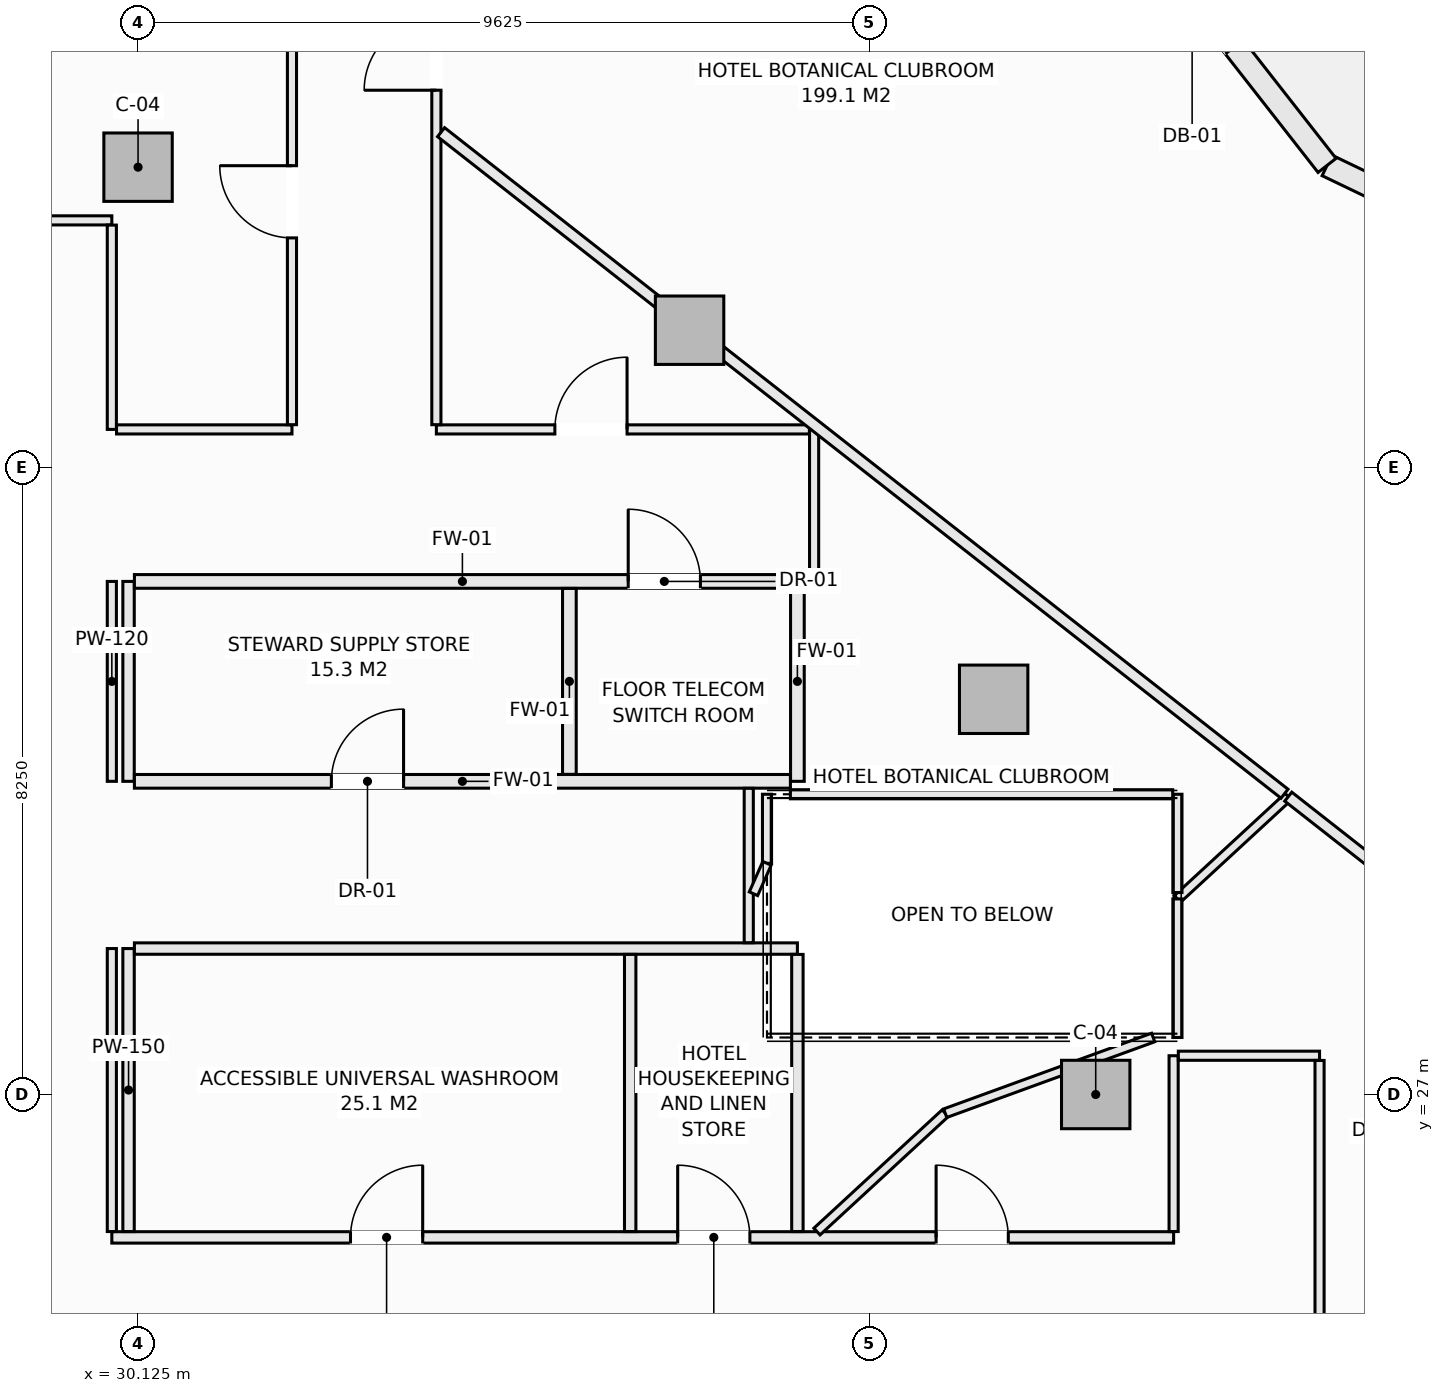
"""IFC4 building model, lengths in metres.
Left out: names, types, materials, properties, quantities, classifications, styles, units other than length and angle.
Written with IfcOpenShell. Run it as: python <this file> out.ifc"""

import sys

from ifc_helpers import new_model, si_unit, direction, frame, frame_2d, origin, origin_2d, place, context, subcontext, project, spatial, rectangle, extrude, element, fill, save


model = new_model("IFC4")
c1 = context("Model", 3, precision=1e-05, world=origin(), true_north=direction((0.0, 1.0)))
c2 = subcontext(c1, "Body", "Model", "MODEL_VIEW")
j1 = project(units=[si_unit("LENGTHUNIT", "METRE"), si_unit("PLANEANGLEUNIT", "RADIAN")], contexts=[c1])
p1 = place(None, origin())
s1 = spatial("IfcSite", under=j1, at=p1, CompositionType="ELEMENT")
p2 = place(p1, origin())
s2 = spatial("IfcBuilding", under=s1, at=p2, CompositionType="ELEMENT")
p3 = place(p2, frame((0.0, 0.0, 115.5)))
s3 = spatial("IfcBuildingStorey", under=s2, at=p3, CompositionType="ELEMENT", Elevation=115.5)
for number, where, z_axis, x_axis in (
    (1, (42.725, 27.0, -0.27), (0.0, 0.0, 1.0), (1.0, 0.0, 0.0)),
    (2, (41.382, 32.199, -0.27), (0.0, 0.0, 1.0), (1.0, 0.0, 0.0)),
    (3, (37.382, 37.055, -0.27), (0.0, 0.0, 1.0), (1.0, 0.0, 0.0)),
    (4, (30.125, 39.2, -0.27), (0.0, 0.0, 1.0), (1.0, 0.0, 0.0)),
):
    element("IfcColumn", number, at=place(p3, frame(where, z_axis=z_axis, x_axis=x_axis)), inside=s3, PredefinedType="COLUMN", context=c2, shape_type="SweptSolid", body=[
        extrude(rectangle(XDim=0.9, YDim=0.9, at=origin_2d()), origin(), (0.0, 0.0, 1.0), 3.4),
    ])
p4 = place(p3, frame((45.769, 39.223, 0.0), z_axis=(0.0, 0.0, 1.0), x_axis=(0.901370184739, -0.433049408339, 0.0)))
e5 = element("IfcWall", 5, at=p4, inside=s3, PredefinedType="SOLIDWALL", context=c2, shape_type="SweptSolid", body=[
    extrude(rectangle(XDim=5.884, YDim=0.3, at=frame_2d((2.942, 0.0))), origin(), (0.0, 0.0, 1.0), 2.653),
])
p5 = place(p4, frame((1.892, 0.0, 0.74)))
e6 = element("IfcOpeningElement", 6, at=p5, cuts=e5, PredefinedType="OPENING", context=c2, shape_type="SweptSolid", body=[
    extrude(rectangle(XDim=2.1, YDim=1.7, at=frame_2d((1.05, 0.85))), frame((0.0, 0.16, 0.0), z_axis=(0.0, -1.0, 0.0), x_axis=(1.0, 0.0, 0.0)), (0.0, 0.0, 1.0), 0.32),
])
p6 = place(p3, frame((42.219, 43.758, 0.0), z_axis=(0.0, 0.0, 1.0), x_axis=(0.616435134162, -0.787405693001, 0.0)))
e7 = element("IfcWall", 7, at=p6, inside=s3, PredefinedType="SOLIDWALL", context=c2, shape_type="SweptSolid", body=[
    extrude(rectangle(XDim=5.759, YDim=0.3, at=frame_2d((2.879, 0.0))), origin(), (0.0, 0.0, 1.0), 2.653),
])
p7 = place(p6, frame((1.979, 0.0, 0.0)))
e8 = element("IfcOpeningElement", 8, at=p7, cuts=e7, PredefinedType="OPENING", context=c2, shape_type="SweptSolid", body=[
    extrude(rectangle(XDim=1.8, YDim=2.25, at=frame_2d((0.9, 1.125))), frame((0.0, 0.16, 0.0), z_axis=(0.0, -1.0, 0.0), x_axis=(1.0, 0.0, 0.0)), (0.0, 0.0, 1.0), 0.32),
])
p8 = place(p3, frame((29.78, 25.12, 0.0), z_axis=(0.0, 0.0, 1.0), x_axis=(1.0, 0.0, 0.0)))
e9 = element("IfcWall", 9, at=p8, inside=s3, PredefinedType="PARTITIONING", context=c2, shape_type="SweptSolid", body=[
    extrude(rectangle(XDim=13.97, YDim=0.15, at=frame_2d((6.985, 0.0))), origin(), (0.0, 0.0, 1.0), 3.13),
])
p9 = place(p8, frame((3.14, 0.0, 0.0)))
e10 = element("IfcOpeningElement", 10, at=p9, cuts=e9, PredefinedType="OPENING", context=c2, shape_type="SweptSolid", body=[
    extrude(rectangle(XDim=0.95, YDim=2.1, at=frame_2d((0.475, 1.05))), frame((0.0, 0.085, 0.0), z_axis=(0.0, -1.0, 0.0), x_axis=(1.0, 0.0, 0.0)), (0.0, 0.0, 1.0), 0.17),
])
p10 = place(p8, frame((7.445, 0.0, 0.0)))
e11 = element("IfcOpeningElement", 11, at=p10, cuts=e9, PredefinedType="OPENING", context=c2, shape_type="SweptSolid", body=[
    extrude(rectangle(XDim=0.95, YDim=2.1, at=frame_2d((0.475, 1.05))), frame((0.0, 0.085, 0.0), z_axis=(0.0, -1.0, 0.0), x_axis=(1.0, 0.0, 0.0)), (0.0, 0.0, 1.0), 0.17),
])
p11 = place(p8, frame((10.845, 0.0, 0.0)))
e12 = element("IfcOpeningElement", 12, at=p11, cuts=e9, PredefinedType="OPENING", context=c2, shape_type="SweptSolid", body=[
    extrude(rectangle(XDim=0.95, YDim=2.1, at=frame_2d((0.475, 1.05))), frame((0.0, 0.085, 0.0), z_axis=(0.0, -1.0, 0.0), x_axis=(1.0, 0.0, 0.0)), (0.0, 0.0, 1.0), 0.17),
])
p12 = place(p3, frame((30.0, 25.197, 0.0), z_axis=(0.0, 0.0, 1.0), x_axis=(0.0, 1.0, 0.0)))
e13 = element("IfcWall", 13, at=p12, inside=s3, PredefinedType="PARTITIONING", context=c2, shape_type="SweptSolid", body=[
    extrude(rectangle(XDim=3.723, YDim=0.15, at=frame_2d((1.861, 0.0))), origin(), (0.0, 0.0, 1.0), 3.13),
])
p13 = place(p3, frame((30.0, 31.12, 0.0), z_axis=(0.0, 0.0, 1.0), x_axis=(0.0, 1.0, 0.0)))
e14 = element("IfcWall", 14, at=p13, inside=s3, PredefinedType="PARTITIONING", context=c2, shape_type="SweptSolid", body=[
    extrude(rectangle(XDim=2.63, YDim=0.15, at=frame_2d((1.315, 0.0))), origin(), (0.0, 0.0, 1.0), 3.13),
])
p14 = place(p3, frame((30.077, 28.92, 0.0), z_axis=(0.0, 0.0, 1.0), x_axis=(1.0, 0.0, 0.0)))
e15 = element("IfcWall", 15, at=p14, inside=s3, PredefinedType="PARTITIONING", context=c2, shape_type="SweptSolid", body=[
    extrude(rectangle(XDim=8.723, YDim=0.15, at=frame_2d((4.362, 0.0))), origin(), (0.0, 0.0, 1.0), 3.13),
])
for number, where, z_axis, x_axis in (
    (16, (36.6, 25.197, 0.0), (0.0, 0.0, 1.0), (0.0, 1.0, 0.0)),
    (17, (38.8, 25.197, 0.0), (0.0, 0.0, 1.0), (0.0, 1.0, 0.0)),
):
    element("IfcWall", number, at=place(p3, frame(where, z_axis=z_axis, x_axis=x_axis)), inside=s3, PredefinedType="PARTITIONING", context=c2, shape_type="SweptSolid", body=[
        extrude(rectangle(XDim=3.646, YDim=0.15, at=frame_2d((1.823, 0.0))), origin(), (0.0, 0.0, 1.0), 3.13),
    ])
p15 = place(p3, frame((38.8, 31.12, 0.0), z_axis=(0.0, 0.0, 1.0), x_axis=(0.0, 1.0, 0.0)))
e18 = element("IfcWall", 18, at=p15, inside=s3, PredefinedType="SOLIDWALL", context=c2, shape_type="SweptSolid", body=[
    extrude(rectangle(XDim=2.63, YDim=0.18, at=frame_2d((1.315, 0.0))), origin(), (0.0, 0.0, 1.0), 3.13),
])
p16 = place(p3, frame((30.077, 31.12, 0.0), z_axis=(0.0, 0.0, 1.0), x_axis=(1.0, 0.0, 0.0)))
e19 = element("IfcWall", 19, at=p16, inside=s3, PredefinedType="SOLIDWALL", context=c2, shape_type="SweptSolid", body=[
    extrude(rectangle(XDim=8.631, YDim=0.18, at=frame_2d((4.315, 0.0))), origin(), (0.0, 0.0, 1.0), 3.13),
])
p17 = place(p16, frame((2.592, 0.0, 0.0)))
e20 = element("IfcOpeningElement", 20, at=p17, cuts=e19, PredefinedType="OPENING", context=c2, shape_type="SweptSolid", body=[
    extrude(rectangle(XDim=0.95, YDim=2.1, at=frame_2d((0.475, 1.05))), frame((0.0, 0.1, 0.0), z_axis=(0.0, -1.0, 0.0), x_axis=(1.0, 0.0, 0.0)), (0.0, 0.0, 1.0), 0.2),
])
p18 = place(p3, frame((30.077, 33.75, 0.0), z_axis=(0.0, 0.0, 1.0), x_axis=(1.0, 0.0, 0.0)))
e21 = element("IfcWall", 21, at=p18, inside=s3, PredefinedType="SOLIDWALL", context=c2, shape_type="SweptSolid", body=[
    extrude(rectangle(XDim=8.631, YDim=0.18, at=frame_2d((4.315, 0.0))), origin(), (0.0, 0.0, 1.0), 3.13),
])
p19 = place(p18, frame((6.497, 0.0, 0.0)))
e22 = element("IfcOpeningElement", 22, at=p19, cuts=e21, PredefinedType="OPENING", context=c2, shape_type="SweptSolid", body=[
    extrude(rectangle(XDim=0.95, YDim=2.1, at=frame_2d((0.475, 1.05))), frame((0.0, 0.1, 0.0), z_axis=(0.0, -1.0, 0.0), x_axis=(1.0, 0.0, 0.0)), (0.0, 0.0, 1.0), 0.2),
])
p20 = place(p3, frame((35.8, 31.212, 0.0), z_axis=(0.0, 0.0, 1.0), x_axis=(0.0, 1.0, 0.0)))
e23 = element("IfcWall", 23, at=p20, inside=s3, PredefinedType="SOLIDWALL", context=c2, shape_type="SweptSolid", body=[
    extrude(rectangle(XDim=2.446, YDim=0.18, at=frame_2d((1.223, 0.0))), origin(), (0.0, 0.0, 1.0), 3.13),
])
p21 = place(p3, frame((39.02, 33.75, 0.0), z_axis=(0.0, 0.0, 1.0), x_axis=(0.0, 1.0, 0.0)))
e24 = element("IfcWall", 24, at=p21, inside=s3, PredefinedType="PARTITIONING", context=c2, shape_type="SweptSolid", body=[
    extrude(rectangle(XDim=2.0, YDim=0.12, at=frame_2d((1.0, 0.0))), origin(), (0.0, 0.0, 1.0), 3.13),
])
p22 = place(p3, frame((27.25, 38.5, 0.0), z_axis=(0.0, 0.0, 1.0), x_axis=(1.0, 0.0, 0.0)))
e25 = element("IfcWall", 25, at=p22, inside=s3, PredefinedType="PARTITIONING", context=c2, shape_type="SweptSolid", body=[
    extrude(rectangle(XDim=2.53, YDim=0.12, at=frame_2d((1.265, 0.0))), origin(), (0.0, 0.0, 1.0), 3.13),
])
p23 = place(p3, frame((29.78, 25.197, 0.0), z_axis=(0.0, 0.0, 1.0), x_axis=(0.0, 1.0, 0.0)))
e26 = element("IfcWall", 26, at=p23, inside=s3, PredefinedType="PARTITIONING", context=c2, shape_type="SweptSolid", body=[
    extrude(rectangle(XDim=3.723, YDim=0.12, at=frame_2d((1.861, 0.0))), origin(), (0.0, 0.0, 1.0), 3.13),
])
p24 = place(p3, frame((29.78, 31.12, 0.0), z_axis=(0.0, 0.0, 1.0), x_axis=(0.0, 1.0, 0.0)))
e27 = element("IfcWall", 27, at=p24, inside=s3, PredefinedType="PARTITIONING", context=c2, shape_type="SweptSolid", body=[
    extrude(rectangle(XDim=2.63, YDim=0.12, at=frame_2d((1.315, 0.0))), origin(), (0.0, 0.0, 1.0), 3.13),
])
p25 = place(p3, frame((29.78, 35.75, 0.0), z_axis=(0.0, 0.0, 1.0), x_axis=(0.0, 1.0, 0.0)))
e28 = element("IfcWall", 28, at=p25, inside=s3, PredefinedType="PARTITIONING", context=c2, shape_type="SweptSolid", body=[
    extrude(rectangle(XDim=2.688, YDim=0.12, at=frame_2d((1.344, 0.0))), origin(), (0.0, 0.0, 1.0), 3.13),
])
p26 = place(p3, frame((29.842, 35.75, 0.0), z_axis=(0.0, 0.0, 1.0), x_axis=(1.0, 0.0, 0.0)))
e29 = element("IfcWall", 29, at=p26, inside=s3, PredefinedType="PARTITIONING", context=c2, shape_type="SweptSolid", body=[
    extrude(rectangle(XDim=2.308, YDim=0.12, at=frame_2d((1.154, 0.0))), origin(), (0.0, 0.0, 1.0), 3.13),
])
p27 = place(p3, frame((34.05, 35.75, 0.0), z_axis=(0.0, 0.0, 1.0), x_axis=(1.0, 0.0, 0.0)))
e30 = element("IfcWall", 30, at=p27, inside=s3, PredefinedType="PARTITIONING", context=c2, shape_type="SweptSolid", body=[
    extrude(rectangle(XDim=4.908, YDim=0.12, at=frame_2d((2.454, 0.0))), origin(), (0.0, 0.0, 1.0), 2.505),
])
p28 = place(p27, frame((1.559, 0.0, 0.0)))
e31 = element("IfcOpeningElement", 31, at=p28, cuts=e30, PredefinedType="OPENING", context=c2, shape_type="SweptSolid", body=[
    extrude(rectangle(XDim=0.95, YDim=2.1, at=frame_2d((0.475, 1.05))), frame((0.0, 0.07, 0.0), z_axis=(0.0, -1.0, 0.0), x_axis=(1.0, 0.0, 0.0)), (0.0, 0.0, 1.0), 0.14),
])
p29 = place(p3, frame((32.15, 35.812, 0.0), z_axis=(0.0, 0.0, 1.0), x_axis=(0.0, 1.0, 0.0)))
e32 = element("IfcWall", 32, at=p29, inside=s3, PredefinedType="PARTITIONING", context=c2, shape_type="SweptSolid", body=[
    extrude(rectangle(XDim=6.388, YDim=0.12, at=frame_2d((3.194, 0.0))), origin(), (0.0, 0.0, 1.0), 3.13),
])
p30 = place(p29, frame((2.458, 0.0, 0.0)))
e33 = element("IfcOpeningElement", 33, at=p30, cuts=e32, PredefinedType="OPENING", context=c2, shape_type="SweptSolid", body=[
    extrude(rectangle(XDim=0.95, YDim=2.1, at=frame_2d((0.475, 1.05))), frame((0.0, 0.07, 0.0), z_axis=(0.0, -1.0, 0.0), x_axis=(1.0, 0.0, 0.0)), (0.0, 0.0, 1.0), 0.14),
])
p31 = place(p3, frame((34.05, 35.812, 0.0), z_axis=(0.0, 0.0, 1.0), x_axis=(0.0, 1.0, 0.0)))
e34 = element("IfcWall", 34, at=p31, inside=s3, PredefinedType="PARTITIONING", context=c2, shape_type="SweptSolid", body=[
    extrude(rectangle(XDim=6.326, YDim=0.12, at=frame_2d((3.163, 0.0))), origin(), (0.0, 0.0, 1.0), 2.812),
])
p32 = place(p31, frame((4.4, 0.0, 0.0)))
e35 = element("IfcOpeningElement", 35, at=p32, cuts=e34, PredefinedType="OPENING", context=c2, shape_type="SweptSolid", body=[
    extrude(rectangle(XDim=0.95, YDim=2.1, at=frame_2d((0.475, 1.05))), frame((0.0, 0.07, 0.0), z_axis=(0.0, -1.0, 0.0), x_axis=(1.0, 0.0, 0.0)), (0.0, 0.0, 1.0), 0.14),
])
p33 = place(p3, frame((38.16, 28.997, 0.0), z_axis=(0.0, 0.0, 1.0), x_axis=(0.0, 1.0, 0.0)))
e36 = element("IfcWall", 36, at=p33, inside=s3, PredefinedType="PARTITIONING", context=c2, shape_type="SweptSolid", body=[
    extrude(rectangle(XDim=2.031, YDim=0.12, at=frame_2d((1.016, 0.0))), origin(), (0.0, 0.0, 1.0), 3.13),
])
p34 = place(p3, frame((43.75, 25.197, 0.0), z_axis=(0.0, 0.0, 1.0), x_axis=(0.0, 1.0, 0.0)))
e37 = element("IfcWall", 37, at=p34, inside=s3, PredefinedType="PARTITIONING", context=c2, shape_type="SweptSolid", body=[
    extrude(rectangle(XDim=2.313, YDim=0.12, at=frame_2d((1.156, 0.0))), origin(), (0.0, 0.0, 1.0), 3.13),
])
p35 = place(p3, frame((43.812, 27.51, 0.0), z_axis=(0.0, 0.0, 1.0), x_axis=(1.0, 0.0, 0.0)))
e38 = element("IfcWall", 38, at=p35, inside=s3, PredefinedType="PARTITIONING", context=c2, shape_type="SweptSolid", body=[
    extrude(rectangle(XDim=1.858, YDim=0.12, at=frame_2d((0.929, 0.0))), origin(), (0.0, 0.0, 1.0), 3.13),
])
p36 = place(p3, frame((45.67, 18.701, 0.0), z_axis=(0.0, 0.0, 1.0), x_axis=(0.0, 1.0, 0.0)))
e39 = element("IfcWall", 39, at=p36, inside=s3, PredefinedType="PARTITIONING", context=c2, shape_type="SweptSolid", body=[
    extrude(rectangle(XDim=8.747, YDim=0.12, at=frame_2d((4.374, 0.0))), origin(), (0.0, 0.0, 1.0), 3.13),
])
p37 = place(p3, frame((39.058, 25.197, 0.0), z_axis=(0.0, 0.0, 1.0), x_axis=(0.73497871786, 0.67809017416, 0.0)))
e40 = element("IfcWall", 40, at=p37, inside=s3, PredefinedType="PARTITIONING", context=c2, shape_type="SweptSolid", body=[
    extrude(rectangle(XDim=2.296, YDim=0.12, at=frame_2d((1.148, 0.0))), origin(), (0.0, 0.0, 1.0), 3.13),
])
p38 = place(p3, frame((43.8, 29.573, 0.0), z_axis=(0.0, 0.0, 1.0), x_axis=(0.734897778704, 0.678177893222, 0.0)))
e41 = element("IfcWall", 41, at=p38, inside=s3, PredefinedType="PARTITIONING", context=c2, shape_type="SweptSolid", body=[
    extrude(rectangle(XDim=1.984, YDim=0.12, at=frame_2d((0.992, 0.0))), origin(), (0.0, 0.0, 1.0), 3.13),
])
p39 = place(p3, frame((40.745, 26.754, 0.0), z_axis=(0.0, 0.0, 1.0), x_axis=(0.939656245212, 0.342120067862, 0.0)))
e42 = element("IfcWall", 42, at=p39, inside=s3, PredefinedType="PARTITIONING", context=c2, shape_type="SweptSolid", body=[
    extrude(rectangle(XDim=2.912, YDim=0.12, at=frame_2d((1.456, 0.0))), origin(), (0.0, 0.0, 1.0), 3.13),
])
p40 = place(p3, frame((43.8, 27.75, 0.0), z_axis=(0.0, 0.0, 1.0), x_axis=(0.0, 1.0, 0.0)))
e43 = element("IfcWall", 43, at=p40, inside=s3, PredefinedType="PARTITIONING", context=c2, shape_type="SweptSolid", body=[
    extrude(rectangle(XDim=1.823, YDim=0.12, at=frame_2d((0.912, 0.0))), origin(), (0.0, 0.0, 1.0), 3.13),
])
p41 = place(p3, frame((43.8, 29.657, 0.0), z_axis=(0.0, 0.0, 1.0), x_axis=(0.0, 1.0, 0.0)))
e44 = element("IfcWall", 44, at=p41, inside=s3, PredefinedType="PARTITIONING", context=c2, shape_type="SweptSolid", body=[
    extrude(rectangle(XDim=1.293, YDim=0.12, at=frame_2d((0.646, 0.0))), origin(), (0.0, 0.0, 1.0), 3.13),
])
p42 = place(p3, frame((34.112, 39.661, 0.0), z_axis=(0.0, 0.0, 1.0), x_axis=(0.786863471843, -0.617127115495, 0.0)))
e45 = element("IfcWall", 45, at=p42, inside=s3, PredefinedType="PARTITIONING", context=c2, shape_type="SweptSolid", body=[
    extrude(rectangle(XDim=14.103, YDim=0.15, at=frame_2d((7.052, 0.0))), origin(), (0.0, 0.0, 1.0), 2.505),
])
p43 = place(p3, frame((45.258, 30.919, 0.0), z_axis=(0.0, 0.0, 1.0), x_axis=(0.786869212034, -0.617119796436, 0.0)))
e46 = element("IfcWall", 46, at=p43, inside=s3, PredefinedType="PARTITIONING", context=c2, shape_type="SweptSolid", body=[
    extrude(rectangle(XDim=10.744, YDim=0.15, at=frame_2d((5.372, 0.0))), origin(), (0.0, 0.0, 1.0), 2.505),
])
p44 = place(p3, frame((38.708, 30.95, 0.0), z_axis=(0.0, 0.0, 1.0), x_axis=(1.0, 0.0, 0.0)))
e47 = element("IfcWall", 47, at=p44, inside=s3, PredefinedType="PARTITIONING", context=c2, shape_type="SweptSolid", body=[
    extrude(rectangle(XDim=5.03, YDim=0.12, at=frame_2d((2.515, 0.0))), origin(), (0.0, 0.0, 1.0), 3.13),
])
p45 = place(p3, frame((38.4, 30.041, 0.0), z_axis=(0.0, 0.0, 1.0), x_axis=(0.0, 1.0, 0.0)))
e48 = element("IfcWall", 48, at=p45, inside=s3, PredefinedType="PARTITIONING", context=c2, shape_type="SweptSolid", body=[
    extrude(rectangle(XDim=0.909, YDim=0.12, at=frame_2d((0.455, 0.0))), origin(), (0.0, 0.0, 1.0), 3.13),
])
p46 = place(p3, frame((38.222, 29.641, 0.0), z_axis=(0.0, 0.0, 1.0), x_axis=(0.406604168362, 0.913604427677, 0.0)))
e49 = element("IfcWall", 49, at=p46, inside=s3, PredefinedType="PARTITIONING", context=c2, shape_type="SweptSolid", body=[
    extrude(rectangle(XDim=0.438, YDim=0.12, at=frame_2d((0.219, 0.0))), origin(), (0.0, 0.0, 1.0), 3.13),
])
p47 = place(p9, origin())
e50 = element("IfcDoor", 50, at=p47, inside=s3, OperationType="SINGLE_SWING_RIGHT", PredefinedType="DOOR", context=c2, shape_type="SweptSolid", body=[
    extrude(rectangle(XDim=0.95, YDim=2.1, at=frame_2d((0.475, 1.05))), frame((0.0, 0.025, 0.0), z_axis=(0.0, -1.0, 0.0), x_axis=(1.0, 0.0, 0.0)), (0.0, 0.0, 1.0), 0.05),
])
fill(e10, e50)
p48 = place(p10, origin())
e51 = element("IfcDoor", 51, at=p48, inside=s3, OperationType="SINGLE_SWING_LEFT", PredefinedType="DOOR", context=c2, shape_type="SweptSolid", body=[
    extrude(rectangle(XDim=0.95, YDim=2.1, at=frame_2d((0.475, 1.05))), frame((0.0, 0.025, 0.0), z_axis=(0.0, -1.0, 0.0), x_axis=(1.0, 0.0, 0.0)), (0.0, 0.0, 1.0), 0.05),
])
fill(e11, e51)
p49 = place(p17, origin())
e52 = element("IfcDoor", 52, at=p49, inside=s3, OperationType="SINGLE_SWING_RIGHT", PredefinedType="DOOR", context=c2, shape_type="SweptSolid", body=[
    extrude(rectangle(XDim=0.95, YDim=2.1, at=frame_2d((0.475, 1.05))), frame((0.0, 0.025, 0.0), z_axis=(0.0, -1.0, 0.0), x_axis=(1.0, 0.0, 0.0)), (0.0, 0.0, 1.0), 0.05),
])
fill(e20, e52)
p50 = place(p19, origin())
e53 = element("IfcDoor", 53, at=p50, inside=s3, OperationType="SINGLE_SWING_LEFT", PredefinedType="DOOR", context=c2, shape_type="SweptSolid", body=[
    extrude(rectangle(XDim=0.95, YDim=2.1, at=frame_2d((0.475, 1.05))), frame((0.0, 0.025, 0.0), z_axis=(0.0, -1.0, 0.0), x_axis=(1.0, 0.0, 0.0)), (0.0, 0.0, 1.0), 0.05),
])
fill(e22, e53)
p51 = place(p11, origin())
e54 = element("IfcDoor", 54, at=p51, inside=s3, OperationType="SINGLE_SWING_LEFT", PredefinedType="DOOR", context=c2, shape_type="SweptSolid", body=[
    extrude(rectangle(XDim=0.95, YDim=2.1, at=frame_2d((0.475, 1.05))), frame((0.0, 0.025, 0.0), z_axis=(0.0, -1.0, 0.0), x_axis=(1.0, 0.0, 0.0)), (0.0, 0.0, 1.0), 0.05),
])
fill(e12, e54)
p52 = place(p28, origin())
e55 = element("IfcDoor", 55, at=p52, inside=s3, OperationType="SINGLE_SWING_RIGHT", PredefinedType="DOOR", context=c2, shape_type="SweptSolid", body=[
    extrude(rectangle(XDim=0.95, YDim=2.1, at=frame_2d((0.475, 1.05))), frame((0.0, 0.025, 0.0), z_axis=(0.0, -1.0, 0.0), x_axis=(1.0, 0.0, 0.0)), (0.0, 0.0, 1.0), 0.05),
])
fill(e31, e55)
p53 = place(p32, origin())
e56 = element("IfcDoor", 56, at=p53, inside=s3, OperationType="SINGLE_SWING_LEFT", PredefinedType="DOOR", context=c2, shape_type="SweptSolid", body=[
    extrude(rectangle(XDim=0.95, YDim=2.1, at=frame_2d((0.475, 1.05))), frame((0.0, 0.025, 0.0), z_axis=(0.0, -1.0, 0.0), x_axis=(1.0, 0.0, 0.0)), (0.0, 0.0, 1.0), 0.05),
])
fill(e35, e56)
p54 = place(p30, origin())
e57 = element("IfcDoor", 57, at=p54, inside=s3, OperationType="SINGLE_SWING_RIGHT", PredefinedType="DOOR", context=c2, shape_type="SweptSolid", body=[
    extrude(rectangle(XDim=0.95, YDim=2.1, at=frame_2d((0.475, 1.05))), frame((0.0, 0.025, 0.0), z_axis=(0.0, -1.0, 0.0), x_axis=(1.0, 0.0, 0.0)), (0.0, 0.0, 1.0), 0.05),
])
fill(e33, e57)
save(model, sys.argv[1])
